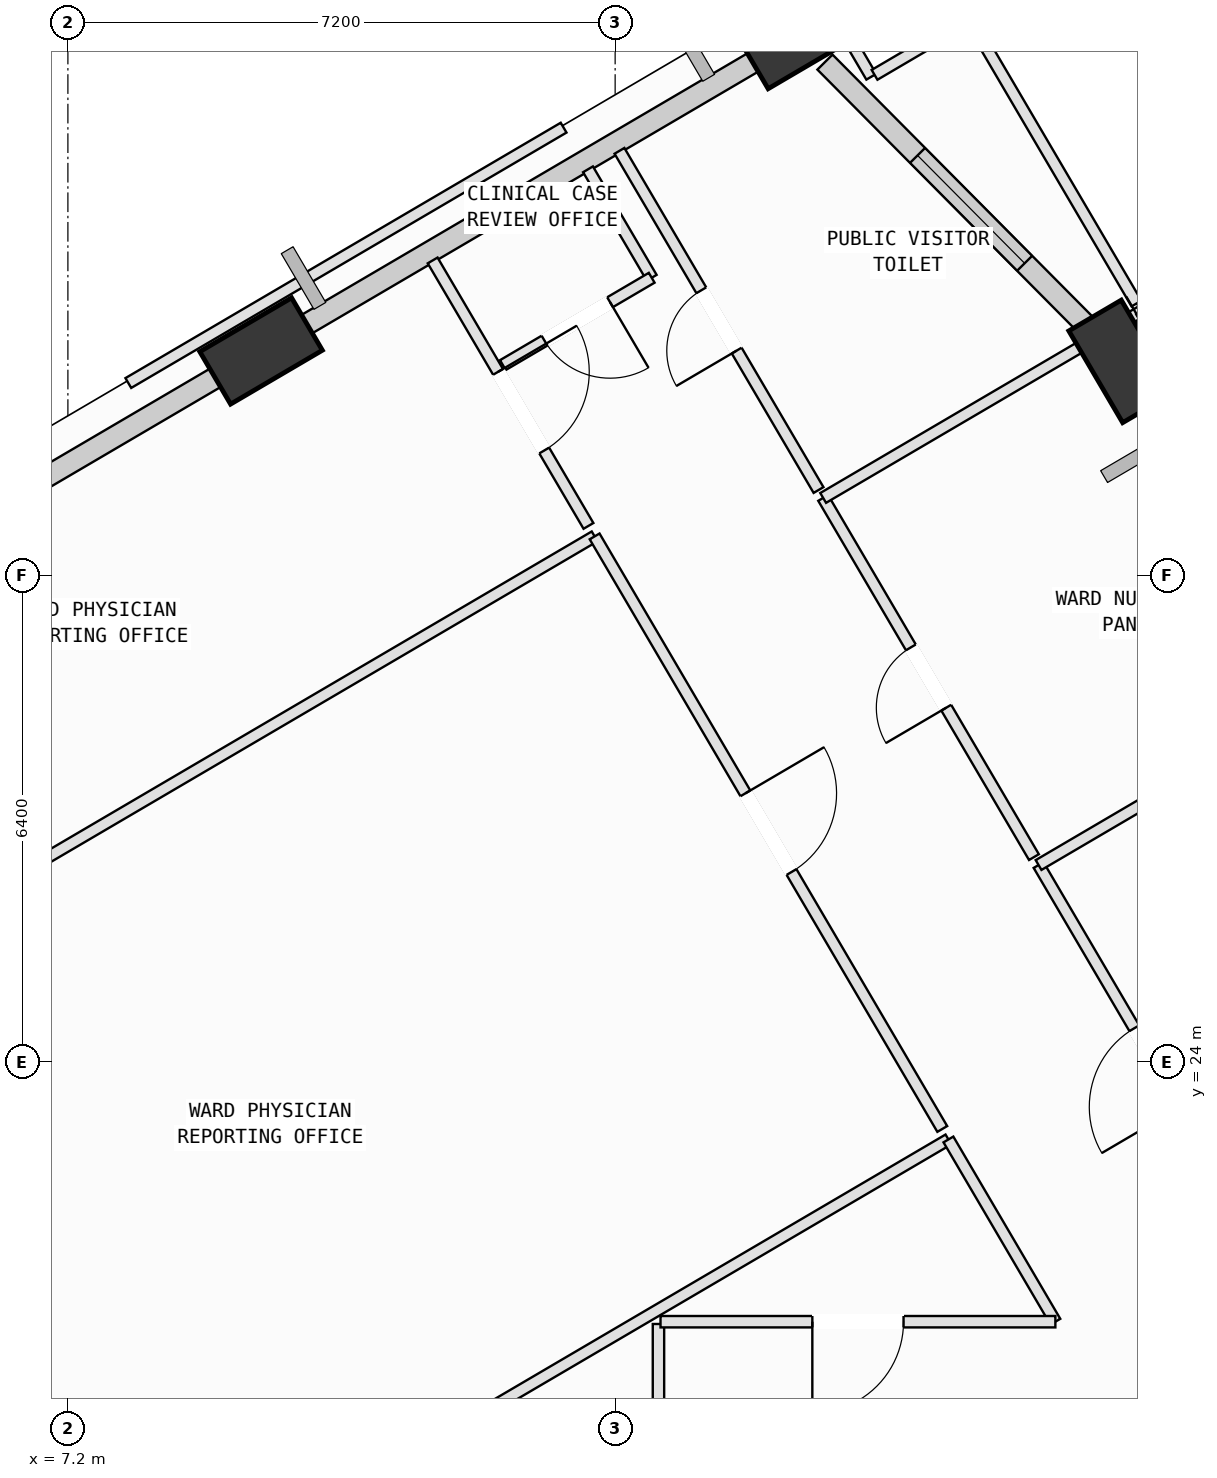
"""IFC4 building model, lengths in metres.
Left out: names, types, materials, properties, quantities, classifications, styles, units other than length and angle.
Written with IfcOpenShell. Run it as: python <this file> out.ifc"""

import sys

from ifc_helpers import new_model, si_unit, direction, frame, frame_2d, origin, origin_2d, place, context, subcontext, project, spatial, rectangle, extrude, element, fill, save


model = new_model("IFC4")
c1 = context("Model", 3, precision=1e-05, world=origin(), true_north=direction((0.0, 1.0)))
c2 = subcontext(c1, "Body", "Model", "MODEL_VIEW")
j1 = project(units=[si_unit("LENGTHUNIT", "METRE"), si_unit("PLANEANGLEUNIT", "RADIAN")], contexts=[c1])
p1 = place(None, origin())
s1 = spatial("IfcSite", under=j1, at=p1, CompositionType="ELEMENT")
p2 = place(p1, origin())
s2 = spatial("IfcBuilding", under=s1, at=p2, CompositionType="ELEMENT")
p3 = place(p2, frame((0.0, 0.0, 153.8)))
s3 = spatial("IfcBuildingStorey", under=s2, at=p3, CompositionType="ELEMENT", Elevation=153.8)
p4 = place(p3, frame((21.068, 33.216, 0.002), z_axis=(-0.034388116319, -0.052130921015, 0.998048007127), x_axis=(0.051597216998, 0.997214254975, 0.053865173095)))
e1 = element("IfcColumn", 1, at=p4, inside=s3, PredefinedType="COLUMN", context=c2, shape_type="SweptSolid", body=[
    extrude(rectangle(XDim=1.4, YDim=0.8, at=origin_2d()), origin(), (0.0, 0.0, 1.0), 4.004),
])
p5 = place(p3, frame((16.814, 37.502, 0.002), z_axis=(-0.051852664615, -0.069745485504, 0.996216275928), x_axis=(0.992953500055, -0.110041878565, 0.043978764079)))
e2 = element("IfcColumn", 2, at=p5, inside=s3, PredefinedType="COLUMN", context=c2, shape_type="SweptSolid", body=[
    extrude(rectangle(XDim=1.4, YDim=0.8, at=origin_2d()), origin(), (0.0, 0.0, 1.0), 4.011),
])
p6 = place(p3, frame((9.742, 33.353, 0.002), z_axis=(-0.034448961233, -0.098668629705, 0.994523891408), x_axis=(0.980197464703, 0.190829958446, 0.052885320728)))
e3 = element("IfcColumn", 3, at=p6, inside=s3, PredefinedType="COLUMN", context=c2, shape_type="SweptSolid", body=[
    extrude(rectangle(XDim=1.4, YDim=0.8, at=origin_2d()), origin(), (0.0, 0.0, 1.0), 4.018),
])
p7 = place(p3, frame((24.49, 27.384, 0.0), z_axis=(0.0, 0.0, 1.0), x_axis=(-0.506018502958, 0.862522622697, 0.0)))
e4 = element("IfcWall", 4, at=p7, inside=s3, PredefinedType="SOLIDWALL", context=c2, shape_type="SweptSolid", body=[
    extrude(rectangle(XDim=6.223, YDim=0.28, at=frame_2d((3.111, 0.0))), origin(), (0.0, 0.0, 1.0), 3.165),
])
p8 = place(p7, frame((3.274, 0.0, 0.75)))
e5 = element("IfcOpeningElement", 5, at=p8, cuts=e4, PredefinedType="OPENING", context=c2, shape_type="SweptSolid", body=[
    extrude(rectangle(XDim=1.6, YDim=1.95, at=frame_2d((0.8, 0.975))), frame((0.0, 0.15, 0.0), z_axis=(0.0, -1.0, 0.0), x_axis=(1.0, 0.0, 0.0)), (0.0, 0.0, 1.0), 0.3),
])
p9 = place(p3, frame((17.16, 37.154, 0.0), z_axis=(0.0, 0.0, 1.0), x_axis=(0.704417095587, -0.709786274483, 0.0)))
e6 = element("IfcWall", 6, at=p9, inside=s3, PredefinedType="SOLIDWALL", context=c2, shape_type="SweptSolid", body=[
    extrude(rectangle(XDim=5.093, YDim=0.28, at=frame_2d((2.546, 0.0))), origin(), (0.0, 0.0, 1.0), 3.165),
])
p10 = place(p9, frame((1.729, 0.0, 0.75)))
e7 = element("IfcOpeningElement", 7, at=p10, cuts=e6, PredefinedType="OPENING", context=c2, shape_type="SweptSolid", body=[
    extrude(rectangle(XDim=2.0, YDim=1.95, at=frame_2d((1.0, 0.975))), frame((0.0, 0.15, 0.0), z_axis=(0.0, -1.0, 0.0), x_axis=(1.0, 0.0, 0.0)), (0.0, 0.0, 1.0), 0.3),
])
p11 = place(p3, frame((10.015, 33.513, 0.0), z_axis=(0.0, 0.0, 1.0), x_axis=(0.862501326744, 0.506054800753, 0.0)))
e8 = element("IfcWall", 8, at=p11, inside=s3, PredefinedType="SOLIDWALL", context=c2, shape_type="SweptSolid", body=[
    extrude(rectangle(XDim=7.231, YDim=0.28, at=frame_2d((3.615, 0.0))), origin(), (0.0, 0.0, 1.0), 3.165),
])
p12 = place(p3, frame((2.922, 29.352, 0.0), z_axis=(0.0, 0.0, 1.0), x_axis=(0.862524124062, 0.506015943831, 0.0)))
e9 = element("IfcWall", 9, at=p12, inside=s3, PredefinedType="SOLIDWALL", context=c2, shape_type="SweptSolid", body=[
    extrude(rectangle(XDim=7.27, YDim=0.28, at=frame_2d((3.635, 0.0))), origin(), (0.0, 0.0, 1.0), 3.165),
])
p13 = place(p3, frame((14.97, 20.55, 0.0), z_axis=(0.0, 0.0, 1.0), x_axis=(0.0, -1.0, 0.0)))
e10 = element("IfcWall", 10, at=p13, inside=s3, PredefinedType="PARTITIONING", context=c2, shape_type="SweptSolid", body=[
    extrude(rectangle(XDim=2.32, YDim=0.15, at=frame_2d((1.16, 0.0))), origin(), (0.0, 0.0, 1.0), 3.78),
])
p14 = place(p3, frame((7.025, 16.078, 0.0), z_axis=(0.0, 0.0, 1.0), x_axis=(0.862494790815, 0.506065940186, 0.0)))
e11 = element("IfcWall", 11, at=p14, inside=s3, PredefinedType="PARTITIONING", context=c2, shape_type="SweptSolid", body=[
    extrude(rectangle(XDim=13.635, YDim=0.15, at=frame_2d((6.817, 0.0))), origin(), (0.0, 0.0, 1.0), 3.78),
])
p15 = place(p3, frame((18.785, 22.978, 0.0), z_axis=(0.0, 0.0, 1.0), x_axis=(0.506064259936, -0.862495776694, 0.0)))
e12 = element("IfcWall", 12, at=p15, inside=s3, PredefinedType="PARTITIONING", context=c2, shape_type="SweptSolid", body=[
    extrude(rectangle(XDim=2.78, YDim=0.15, at=frame_2d((1.39, 0.0))), origin(), (0.0, 0.0, 1.0), 3.78),
])
p16 = place(p3, frame((20.192, 20.58, 0.0), z_axis=(0.0, 0.0, 1.0), x_axis=(-1.0, 0.0, 0.0)))
e13 = element("IfcWall", 13, at=p16, inside=s3, PredefinedType="PARTITIONING", context=c2, shape_type="SweptSolid", body=[
    extrude(rectangle(XDim=5.195, YDim=0.15, at=frame_2d((2.597, 0.0))), origin(), (0.0, 0.0, 1.0), 3.78),
])
p17 = place(p16, frame((1.998, 0.0, 0.0)))
e14 = element("IfcOpeningElement", 14, at=p17, cuts=e13, PredefinedType="OPENING", context=c2, shape_type="SweptSolid", body=[
    extrude(rectangle(XDim=1.2, YDim=2.15, at=frame_2d((0.6, 1.075))), frame((0.0, 0.085, 0.0), z_axis=(0.0, -1.0, 0.0), x_axis=(1.0, 0.0, 0.0)), (0.0, 0.0, 1.0), 0.17),
])
p18 = place(p3, frame((2.072, 23.839, 0.0), z_axis=(0.0, 0.0, 1.0), x_axis=(0.862523991111, 0.506016170452, 0.0)))
e15 = element("IfcWall", 15, at=p18, inside=s3, PredefinedType="PARTITIONING", context=c2, shape_type="SweptSolid", body=[
    extrude(rectangle(XDim=13.98, YDim=0.15, at=frame_2d((6.99, 0.0))), origin(), (0.0, 0.0, 1.0), 3.78),
])
p19 = place(p3, frame((14.13, 30.913, 0.0), z_axis=(0.0, 0.0, 1.0), x_axis=(0.506007110353, -0.862529306327, 0.0)))
e16 = element("IfcWall", 16, at=p19, inside=s3, PredefinedType="PARTITIONING", context=c2, shape_type="SweptSolid", body=[
    extrude(rectangle(XDim=9.04, YDim=0.15, at=frame_2d((4.52, 0.0))), origin(), (0.0, 0.0, 1.0), 3.78),
])
p20 = place(p19, frame((3.92, 0.0, 0.0)))
e17 = element("IfcOpeningElement", 17, at=p20, cuts=e16, PredefinedType="OPENING", context=c2, shape_type="SweptSolid", body=[
    extrude(rectangle(XDim=1.2, YDim=2.15, at=frame_2d((0.6, 1.075))), frame((0.0, 0.085, 0.0), z_axis=(0.0, -1.0, 0.0), x_axis=(1.0, 0.0, 0.0)), (0.0, 0.0, 1.0), 0.17),
])
p21 = place(p3, frame((9.106, 33.177, 0.0), z_axis=(0.0, 0.0, 1.0), x_axis=(0.862486191726, 0.506080595442, 0.0)))
e18 = element("IfcWall", 18, at=p21, inside=s3, PredefinedType="PARTITIONING", context=c2, shape_type="SweptSolid", body=[
    extrude(rectangle(XDim=0.954, YDim=0.15, at=frame_2d((0.477, 0.0))), origin(), (0.0, 0.0, 1.0), 3.78),
])
p22 = place(p3, frame((11.999, 34.544, 0.0), z_axis=(0.0, 0.0, 1.0), x_axis=(0.506174252811, -0.862431229601, 0.0)))
e19 = element("IfcWall", 19, at=p22, inside=s3, PredefinedType="PARTITIONING", context=c2, shape_type="SweptSolid", body=[
    extrude(rectangle(XDim=4.05, YDim=0.15, at=frame_2d((2.025, 0.0))), origin(), (0.0, 0.0, 1.0), 3.78),
])
p23 = place(p22, frame((1.7, 0.0, 0.0)))
e20 = element("IfcOpeningElement", 20, at=p23, cuts=e19, PredefinedType="OPENING", context=c2, shape_type="SweptSolid", body=[
    extrude(rectangle(XDim=1.2, YDim=2.15, at=frame_2d((0.6, 1.075))), frame((0.0, 0.085, 0.0), z_axis=(0.0, -1.0, 0.0), x_axis=(1.0, 0.0, 0.0)), (0.0, 0.0, 1.0), 0.17),
])
p24 = place(p3, frame((23.098, 21.259, 0.0), z_axis=(0.0, 0.0, 1.0), x_axis=(-0.506011476282, 0.862526745018, 0.0)))
e21 = element("IfcWall", 21, at=p24, inside=s3, PredefinedType="PARTITIONING", context=c2, shape_type="SweptSolid", body=[
    extrude(rectangle(XDim=6.18, YDim=0.15, at=frame_2d((3.09, 0.0))), origin(), (0.0, 0.0, 1.0), 3.78),
])
p25 = place(p24, frame((2.49, 0.0, 0.0)))
e22 = element("IfcOpeningElement", 22, at=p25, cuts=e21, PredefinedType="OPENING", context=c2, shape_type="SweptSolid", body=[
    extrude(rectangle(XDim=1.2, YDim=2.15, at=frame_2d((0.6, 1.075))), frame((0.0, 0.085, 0.0), z_axis=(0.0, -1.0, 0.0), x_axis=(1.0, 0.0, 0.0)), (0.0, 0.0, 1.0), 0.17),
])
p26 = place(p3, frame((19.971, 26.589, 0.0), z_axis=(0.0, 0.0, 1.0), x_axis=(0.86252592409, 0.506012875599, 0.0)))
e23 = element("IfcWall", 23, at=p26, inside=s3, PredefinedType="PARTITIONING", context=c2, shape_type="SweptSolid", body=[
    extrude(rectangle(XDim=4.186, YDim=0.15, at=frame_2d((2.093, 0.0))), origin(), (0.0, 0.0, 1.0), 3.78),
])
p27 = place(p3, frame((19.91, 26.693, 0.0), z_axis=(0.0, 0.0, 1.0), x_axis=(-0.506077370403, 0.862488084072, 0.0)))
e24 = element("IfcWall", 24, at=p27, inside=s3, PredefinedType="PARTITIONING", context=c2, shape_type="SweptSolid", body=[
    extrude(rectangle(XDim=5.479, YDim=0.15, at=frame_2d((2.74, 0.0))), origin(), (0.0, 0.0, 1.0), 3.78),
])
p28 = place(p27, frame((2.28, 0.0, 0.0)))
e25 = element("IfcOpeningElement", 25, at=p28, cuts=e24, PredefinedType="OPENING", context=c2, shape_type="SweptSolid", body=[
    extrude(rectangle(XDim=0.92, YDim=2.1, at=frame_2d((0.46, 1.05))), frame((0.0, 0.085, 0.0), z_axis=(0.0, -1.0, 0.0), x_axis=(1.0, 0.0, 0.0)), (0.0, 0.0, 1.0), 0.17),
])
p29 = place(p3, frame((17.137, 31.419, 0.0), z_axis=(0.0, 0.0, 1.0), x_axis=(0.862476712349, 0.506096750292, 0.0)))
e26 = element("IfcWall", 26, at=p29, inside=s3, PredefinedType="PARTITIONING", context=c2, shape_type="SweptSolid", body=[
    extrude(rectangle(XDim=4.069, YDim=0.15, at=frame_2d((2.034, 0.0))), origin(), (0.0, 0.0, 1.0), 3.78),
])
p30 = place(p3, frame((20.848, 33.596, 0.0), z_axis=(0.0, 0.0, 1.0), x_axis=(0.862449638913, 0.506142885298, 0.0)))
e27 = element("IfcWall", 27, at=p30, inside=s3, PredefinedType="PARTITIONING", context=c2, shape_type="SweptSolid", body=[
    extrude(rectangle(XDim=0.547, YDim=0.15, at=frame_2d((0.274, 0.0))), origin(), (0.0, 0.0, 1.0), 3.78),
])
p31 = place(p3, frame((21.32, 33.873, 0.0), z_axis=(0.0, 0.0, 1.0), x_axis=(0.506057922568, -0.862499495076, 0.0)))
e28 = element("IfcWall", 28, at=p31, inside=s3, PredefinedType="PARTITIONING", context=c2, shape_type="SweptSolid", body=[
    extrude(rectangle(XDim=5.479, YDim=0.15, at=frame_2d((2.74, 0.0))), origin(), (0.0, 0.0, 1.0), 3.78),
])
p32 = place(p3, frame((19.063, 37.72, 0.0), z_axis=(0.0, 0.0, 1.0), x_axis=(0.50604865204, -0.862504934344, 0.0)))
e29 = element("IfcWall", 29, at=p32, inside=s3, PredefinedType="PARTITIONING", context=c2, shape_type="SweptSolid", body=[
    extrude(rectangle(XDim=4.34, YDim=0.15, at=frame_2d((2.17, 0.0))), origin(), (0.0, 0.0, 1.0), 3.78),
])
p33 = place(p3, frame((17.076, 31.523, 0.0), z_axis=(0.0, 0.0, 1.0), x_axis=(-0.506089954955, 0.86248069978, 0.0)))
e30 = element("IfcWall", 30, at=p33, inside=s3, PredefinedType="PARTITIONING", context=c2, shape_type="SweptSolid", body=[
    extrude(rectangle(XDim=5.175, YDim=0.15, at=frame_2d((2.587, 0.0))), origin(), (0.0, 0.0, 1.0), 3.78),
])
p34 = place(p33, frame((2.127, 0.0, 0.0)))
e31 = element("IfcOpeningElement", 31, at=p34, cuts=e30, PredefinedType="OPENING", context=c2, shape_type="SweptSolid", body=[
    extrude(rectangle(XDim=0.92, YDim=2.1, at=frame_2d((0.46, 1.05))), frame((0.0, 0.085, 0.0), z_axis=(0.0, -1.0, 0.0), x_axis=(1.0, 0.0, 0.0)), (0.0, 0.0, 1.0), 0.17),
])
p35 = place(p3, frame((16.156, 37.336, 0.0), z_axis=(0.0, 0.0, 1.0), x_axis=(0.862273197532, 0.506443415217, 0.0)))
e32 = element("IfcWall", 32, at=p35, inside=s3, PredefinedType="PARTITIONING", context=c2, shape_type="SweptSolid", body=[
    extrude(rectangle(XDim=1.203, YDim=0.15, at=frame_2d((0.602, 0.0))), origin(), (0.0, 0.0, 1.0), 3.165),
])
p36 = place(p3, frame((17.218, 37.902, 0.0), z_axis=(0.0, 0.0, 1.0), x_axis=(0.505914729654, -0.862583495274, 0.0)))
e33 = element("IfcWall", 33, at=p36, inside=s3, PredefinedType="PARTITIONING", context=c2, shape_type="SweptSolid", body=[
    extrude(rectangle(XDim=1.091, YDim=0.15, at=frame_2d((0.545, 0.0))), origin(), (0.0, 0.0, 1.0), 3.78),
])
p37 = place(p3, frame((17.813, 36.986, 0.0), z_axis=(0.0, 0.0, 1.0), x_axis=(0.862256846082, 0.506471254252, 0.0)))
e34 = element("IfcWall", 34, at=p37, inside=s3, PredefinedType="PARTITIONING", context=c2, shape_type="SweptSolid", body=[
    extrude(rectangle(XDim=1.4, YDim=0.15, at=frame_2d((0.7, 0.0))), origin(), (0.0, 0.0, 1.0), 3.78),
])
p38 = place(p3, frame((7.995, 32.931, 0.0), z_axis=(0.0, 0.0, 1.0), x_axis=(0.86249986981, 0.506057283889, 0.0)))
e35 = element("IfcWall", 35, at=p38, inside=s3, PredefinedType="PARTITIONING", context=c2, shape_type="SweptSolid", body=[
    extrude(rectangle(XDim=6.64, YDim=0.15, at=frame_2d((3.32, 0.0))), origin(), (0.0, 0.0, 1.0), 3.78),
])
p39 = place(p3, frame((14.043, 35.743, 0.0), z_axis=(0.0, 0.0, 1.0), x_axis=(0.50644622965, -0.862271544511, 0.0)))
e36 = element("IfcWall", 36, at=p39, inside=s3, PredefinedType="PARTITIONING", context=c2, shape_type="SweptSolid", body=[
    extrude(rectangle(XDim=1.655, YDim=0.15, at=frame_2d((0.828, 0.0))), origin(), (0.0, 0.0, 1.0), 3.78),
])
p40 = place(p3, frame((14.881, 34.316, 0.0), z_axis=(0.0, 0.0, 1.0), x_axis=(-0.862481095213, -0.506089281056, 0.0)))
e37 = element("IfcWall", 37, at=p40, inside=s3, PredefinedType="PARTITIONING", context=c2, shape_type="SweptSolid", body=[
    extrude(rectangle(XDim=2.27, YDim=0.15, at=frame_2d((1.135, 0.0))), origin(), (0.0, 0.0, 1.0), 3.78),
])
p41 = place(p40, frame((0.635, 0.0, 0.0)))
e38 = element("IfcOpeningElement", 38, at=p41, cuts=e37, PredefinedType="OPENING", context=c2, shape_type="SweptSolid", body=[
    extrude(rectangle(XDim=1.0, YDim=2.12, at=frame_2d((0.5, 1.06))), frame((0.0, 0.085, 0.0), z_axis=(0.0, -1.0, 0.0), x_axis=(1.0, 0.0, 0.0)), (0.0, 0.0, 1.0), 0.17),
])
p42 = place(p10, origin())
e39 = element("IfcWindow", 39, at=p42, inside=s3, PartitioningType="SINGLE_PANEL", PredefinedType="WINDOW", context=c2, shape_type="SweptSolid", body=[
    extrude(rectangle(XDim=2.0, YDim=1.95, at=frame_2d((1.0, 0.975))), frame((0.0, 0.03, 0.0), z_axis=(0.0, -1.0, 0.0), x_axis=(1.0, 0.0, 0.0)), (0.0, 0.0, 1.0), 0.06),
])
fill(e7, e39)
p43 = place(p17, origin())
e40 = element("IfcDoor", 40, at=p43, inside=s3, OperationType="SINGLE_SWING_RIGHT", PredefinedType="DOOR", context=c2, shape_type="SweptSolid", body=[
    extrude(rectangle(XDim=1.2, YDim=2.15, at=frame_2d((0.6, 1.075))), frame((0.0, 0.025, 0.0), z_axis=(0.0, -1.0, 0.0), x_axis=(1.0, 0.0, 0.0)), (0.0, 0.0, 1.0), 0.05),
])
fill(e14, e40)
p44 = place(p20, origin())
e41 = element("IfcDoor", 41, at=p44, inside=s3, OperationType="SINGLE_SWING_LEFT", PredefinedType="DOOR", context=c2, shape_type="SweptSolid", body=[
    extrude(rectangle(XDim=1.2, YDim=2.15, at=frame_2d((0.6, 1.075))), frame((0.0, 0.025, 0.0), z_axis=(0.0, -1.0, 0.0), x_axis=(1.0, 0.0, 0.0)), (0.0, 0.0, 1.0), 0.05),
])
fill(e17, e41)
p45 = place(p23, origin())
e42 = element("IfcDoor", 42, at=p45, inside=s3, OperationType="SINGLE_SWING_LEFT", PredefinedType="DOOR", context=c2, shape_type="SweptSolid", body=[
    extrude(rectangle(XDim=1.2, YDim=2.15, at=frame_2d((0.6, 1.075))), frame((0.0, 0.025, 0.0), z_axis=(0.0, -1.0, 0.0), x_axis=(1.0, 0.0, 0.0)), (0.0, 0.0, 1.0), 0.05),
])
fill(e20, e42)
p46 = place(p25, origin())
e43 = element("IfcDoor", 43, at=p46, inside=s3, OperationType="SINGLE_SWING_LEFT", PredefinedType="DOOR", context=c2, shape_type="SweptSolid", body=[
    extrude(rectangle(XDim=1.2, YDim=2.15, at=frame_2d((0.6, 1.075))), frame((0.0, 0.025, 0.0), z_axis=(0.0, -1.0, 0.0), x_axis=(1.0, 0.0, 0.0)), (0.0, 0.0, 1.0), 0.05),
])
fill(e22, e43)
p47 = place(p28, origin())
e44 = element("IfcDoor", 44, at=p47, inside=s3, OperationType="SINGLE_SWING_LEFT", PredefinedType="DOOR", context=c2, shape_type="SweptSolid", body=[
    extrude(rectangle(XDim=0.92, YDim=2.1, at=frame_2d((0.46, 1.05))), frame((0.0, 0.025, 0.0), z_axis=(0.0, -1.0, 0.0), x_axis=(1.0, 0.0, 0.0)), (0.0, 0.0, 1.0), 0.05),
])
fill(e25, e44)
p48 = place(p34, origin())
e45 = element("IfcDoor", 45, at=p48, inside=s3, OperationType="SINGLE_SWING_LEFT", PredefinedType="DOOR", context=c2, shape_type="SweptSolid", body=[
    extrude(rectangle(XDim=0.92, YDim=2.1, at=frame_2d((0.46, 1.05))), frame((0.0, 0.025, 0.0), z_axis=(0.0, -1.0, 0.0), x_axis=(1.0, 0.0, 0.0)), (0.0, 0.0, 1.0), 0.05),
])
fill(e31, e45)
p49 = place(p41, origin())
e46 = element("IfcDoor", 46, at=p49, inside=s3, OperationType="SINGLE_SWING_LEFT", PredefinedType="DOOR", context=c2, shape_type="SweptSolid", body=[
    extrude(rectangle(XDim=1.0, YDim=2.12, at=frame_2d((0.5, 1.06))), frame((0.0, 0.025, 0.0), z_axis=(0.0, -1.0, 0.0), x_axis=(1.0, 0.0, 0.0)), (0.0, 0.0, 1.0), 0.05),
])
fill(e38, e46)
save(model, sys.argv[1])
